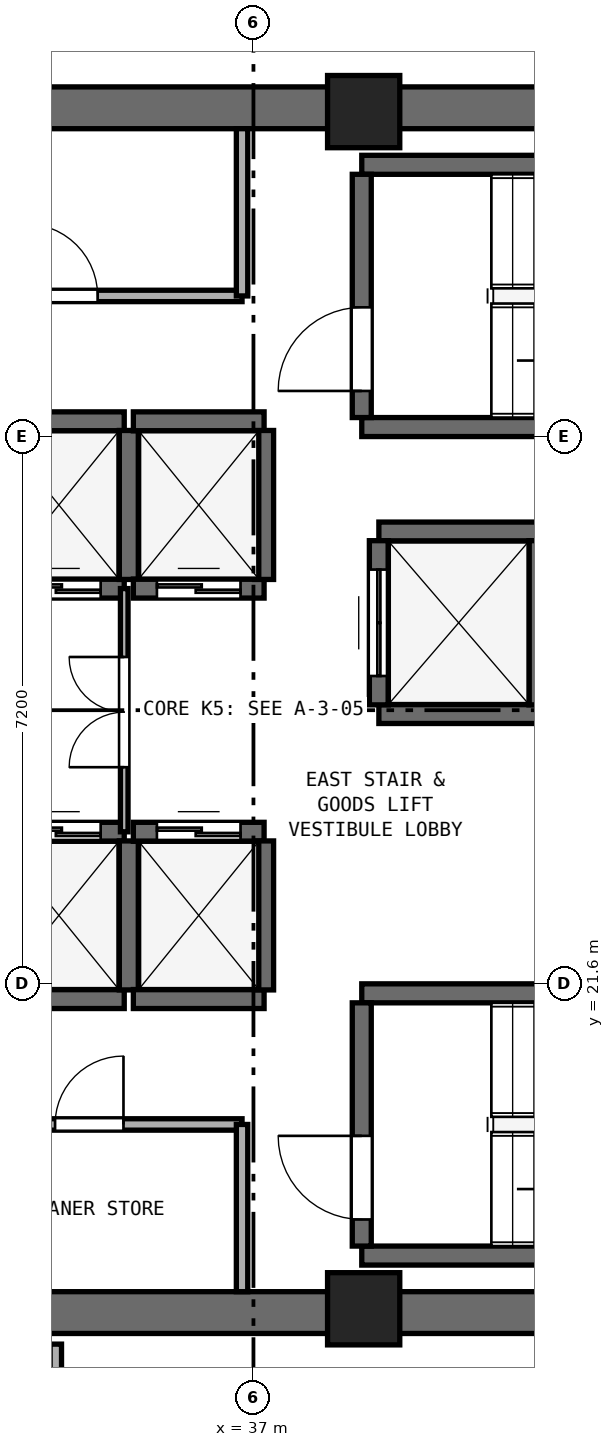
"""IFC4 building model, lengths in metres.
Left out: names, types, materials, properties, quantities, classifications, styles, units other than length and angle.
Written with IfcOpenShell. Run it as: python <this file> out.ifc"""

import sys

from ifc_helpers import new_model, si_unit, direction, frame, frame_2d, origin, origin_2d, place, context, subcontext, project, spatial, rectangle, extrude, element, fill, save


model = new_model("IFC4")
c1 = context("Model", 3, precision=1e-05, world=origin(), true_north=direction((0.0, 1.0)))
c2 = subcontext(c1, "Body", "Model", "MODEL_VIEW")
j1 = project(units=[si_unit("LENGTHUNIT", "METRE"), si_unit("PLANEANGLEUNIT", "RADIAN")], contexts=[c1])
p1 = place(None, origin())
s1 = spatial("IfcSite", under=j1, at=p1, CompositionType="ELEMENT")
p2 = place(p1, origin())
s2 = spatial("IfcBuilding", under=s1, at=p2, CompositionType="ELEMENT")
p3 = place(p2, frame((0.0, 0.0, 125.0)))
s3 = spatial("IfcBuildingStorey", under=s2, at=p3, CompositionType="ELEMENT", Elevation=125.0)
for number, where, z_axis, x_axis in (
    (1, (25.4, 17.275, 0.0), (0.0, 0.0, 1.0), (1.0, 0.0, 0.0)),
    (2, (25.4, 33.125, 0.0), (0.0, 0.0, 1.0), (1.0, 0.0, 0.0)),
):
    element("IfcWall", number, at=place(p3, frame(where, z_axis=z_axis, x_axis=x_axis)), inside=s3, PredefinedType="SHEAR", context=c2, shape_type="SweptSolid", body=[
        extrude(rectangle(XDim=23.2, YDim=0.55, at=frame_2d((11.6, 0.0))), origin(), (0.0, 0.0, 1.0), 3.54),
    ])
for number, where, z_axis, x_axis in (
    (3, (38.45, 17.325, 0.0), (0.0, 0.0, 1.0), (1.0, 0.0, 0.0)),
    (4, (38.45, 33.075, 0.0), (0.0, 0.0, 1.0), (1.0, 0.0, 0.0)),
):
    element("IfcColumn", number, at=place(p3, frame(where, z_axis=z_axis, x_axis=x_axis)), inside=s3, PredefinedType="PILASTER", context=c2, shape_type="SweptSolid", body=[
        extrude(rectangle(XDim=0.95, YDim=0.95, at=origin_2d()), origin(), (0.0, 0.0, 1.0), 3.8),
    ])
for number, where, z_axis, x_axis in (
    (5, (38.425, 28.925, 0.0), (0.0, 0.0, 1.0), (1.0, 0.0, 0.0)),
    (6, (38.425, 32.375, 0.0), (0.0, 0.0, 1.0), (1.0, 0.0, 0.0)),
):
    element("IfcWall", number, at=place(p3, frame(where, z_axis=z_axis, x_axis=x_axis)), inside=s3, PredefinedType="SHEAR", context=c2, shape_type="SweptSolid", body=[
        extrude(rectangle(XDim=7.3, YDim=0.25, at=frame_2d((3.65, 0.0))), origin(), (0.0, 0.0, 1.0), 3.54),
    ])
p4 = place(p3, frame((38.425, 29.05, 0.0), z_axis=(0.0, 0.0, 1.0), x_axis=(0.0, 1.0, 0.0)))
e7 = element("IfcWall", 7, at=p4, inside=s3, PredefinedType="SHEAR", context=c2, shape_type="SweptSolid", body=[
    extrude(rectangle(XDim=3.2, YDim=0.25, at=frame_2d((1.6, 0.0))), origin(), (0.0, 0.0, 1.0), 3.54),
])
p5 = place(p4, frame((0.35, 0.0, 0.0)))
e8 = element("IfcOpeningElement", 8, at=p5, cuts=e7, PredefinedType="OPENING", context=c2, shape_type="SweptSolid", body=[
    extrude(rectangle(XDim=1.1, YDim=2.15, at=frame_2d((0.55, 1.075))), frame((0.0, 0.135, 0.0), z_axis=(0.0, -1.0, 0.0), x_axis=(1.0, 0.0, 0.0)), (0.0, 0.0, 1.0), 0.27),
])
for number, where, z_axis, x_axis in (
    (9, (38.425, 18.025, 0.0), (0.0, 0.0, 1.0), (1.0, 0.0, 0.0)),
    (10, (38.425, 21.475, 0.0), (0.0, 0.0, 1.0), (1.0, 0.0, 0.0)),
):
    element("IfcWall", number, at=place(p3, frame(where, z_axis=z_axis, x_axis=x_axis)), inside=s3, PredefinedType="SHEAR", context=c2, shape_type="SweptSolid", body=[
        extrude(rectangle(XDim=7.3, YDim=0.25, at=frame_2d((3.65, 0.0))), origin(), (0.0, 0.0, 1.0), 3.54),
    ])
p6 = place(p3, frame((38.425, 18.15, 0.0), z_axis=(0.0, 0.0, 1.0), x_axis=(0.0, 1.0, 0.0)))
e11 = element("IfcWall", 11, at=p6, inside=s3, PredefinedType="SHEAR", context=c2, shape_type="SweptSolid", body=[
    extrude(rectangle(XDim=3.2, YDim=0.25, at=frame_2d((1.6, 0.0))), origin(), (0.0, 0.0, 1.0), 3.54),
])
p7 = place(p6, frame((0.35, 0.0, 0.0)))
e12 = element("IfcOpeningElement", 12, at=p7, cuts=e11, PredefinedType="OPENING", context=c2, shape_type="SweptSolid", body=[
    extrude(rectangle(XDim=1.1, YDim=2.15, at=frame_2d((0.55, 1.075))), frame((0.0, 0.135, 0.0), z_axis=(0.0, -1.0, 0.0), x_axis=(1.0, 0.0, 0.0)), (0.0, 0.0, 1.0), 0.27),
])
p8 = place(p3, frame((33.58, 21.4, 0.0), z_axis=(0.0, 0.0, 1.0), x_axis=(1.0, 0.0, 0.0)))
e13 = element("IfcWall", 13, at=p8, inside=s3, PredefinedType="SHEAR", context=c2, shape_type="SweptSolid", body=[
    extrude(rectangle(XDim=1.72, YDim=0.25, at=frame_2d((0.86, 0.0))), origin(), (0.0, 0.0, 1.0), 3.54),
])
p9 = place(p3, frame((33.58, 23.6, 0.0), z_axis=(0.0, 0.0, 1.0), x_axis=(1.0, 0.0, 0.0)))
e14 = element("IfcWall", 14, at=p9, inside=s3, PredefinedType="SHEAR", context=c2, shape_type="SweptSolid", body=[
    extrude(rectangle(XDim=1.72, YDim=0.25, at=frame_2d((0.86, 0.0))), origin(), (0.0, 0.0, 1.0), 3.54),
])
p10 = place(p9, frame((0.31, 0.0, 0.0)))
e15 = element("IfcOpeningElement", 15, at=p10, cuts=e14, PredefinedType="OPENING", context=c2, shape_type="SweptSolid", body=[
    extrude(rectangle(XDim=1.1, YDim=2.15, at=frame_2d((0.55, 1.075))), frame((0.0, 0.135, 0.0), z_axis=(0.0, -1.0, 0.0), x_axis=(1.0, 0.0, 0.0)), (0.0, 0.0, 1.0), 0.27),
])
p11 = place(p3, frame((35.36, 21.52, 0.0), z_axis=(0.0, 0.0, 1.0), x_axis=(0.0, 1.0, 0.0)))
e16 = element("IfcWall", 16, at=p11, inside=s3, PredefinedType="SHEAR", context=c2, shape_type="SweptSolid", body=[
    extrude(rectangle(XDim=1.96, YDim=0.25, at=frame_2d((0.98, 0.0))), origin(), (0.0, 0.0, 1.0), 3.54),
])
p12 = place(p3, frame((35.42, 21.4, 0.0), z_axis=(0.0, 0.0, 1.0), x_axis=(1.0, 0.0, 0.0)))
e17 = element("IfcWall", 17, at=p12, inside=s3, PredefinedType="SHEAR", context=c2, shape_type="SweptSolid", body=[
    extrude(rectangle(XDim=1.72, YDim=0.25, at=frame_2d((0.86, 0.0))), origin(), (0.0, 0.0, 1.0), 3.54),
])
p13 = place(p3, frame((35.42, 23.6, 0.0), z_axis=(0.0, 0.0, 1.0), x_axis=(1.0, 0.0, 0.0)))
e18 = element("IfcWall", 18, at=p13, inside=s3, PredefinedType="SHEAR", context=c2, shape_type="SweptSolid", body=[
    extrude(rectangle(XDim=1.72, YDim=0.25, at=frame_2d((0.86, 0.0))), origin(), (0.0, 0.0, 1.0), 3.54),
])
p14 = place(p13, frame((0.31, 0.0, 0.0)))
e19 = element("IfcOpeningElement", 19, at=p14, cuts=e18, PredefinedType="OPENING", context=c2, shape_type="SweptSolid", body=[
    extrude(rectangle(XDim=1.1, YDim=2.15, at=frame_2d((0.55, 1.075))), frame((0.0, 0.135, 0.0), z_axis=(0.0, -1.0, 0.0), x_axis=(1.0, 0.0, 0.0)), (0.0, 0.0, 1.0), 0.27),
])
p15 = place(p3, frame((37.14, 21.52, 0.0), z_axis=(0.0, 0.0, 1.0), x_axis=(0.0, 1.0, 0.0)))
e20 = element("IfcWall", 20, at=p15, inside=s3, PredefinedType="SHEAR", context=c2, shape_type="SweptSolid", body=[
    extrude(rectangle(XDim=1.96, YDim=0.25, at=frame_2d((0.98, 0.0))), origin(), (0.0, 0.0, 1.0), 3.54),
])
p16 = place(p3, frame((33.58, 26.8, 0.0), z_axis=(0.0, 0.0, 1.0), x_axis=(1.0, 0.0, 0.0)))
e21 = element("IfcWall", 21, at=p16, inside=s3, PredefinedType="SHEAR", context=c2, shape_type="SweptSolid", body=[
    extrude(rectangle(XDim=1.72, YDim=0.25, at=frame_2d((0.86, 0.0))), origin(), (0.0, 0.0, 1.0), 3.54),
])
p17 = place(p16, frame((0.31, 0.0, 0.0)))
e22 = element("IfcOpeningElement", 22, at=p17, cuts=e21, PredefinedType="OPENING", context=c2, shape_type="SweptSolid", body=[
    extrude(rectangle(XDim=1.1, YDim=2.15, at=frame_2d((0.55, 1.075))), frame((0.0, 0.135, 0.0), z_axis=(0.0, -1.0, 0.0), x_axis=(1.0, 0.0, 0.0)), (0.0, 0.0, 1.0), 0.27),
])
p18 = place(p3, frame((33.58, 29.0, 0.0), z_axis=(0.0, 0.0, 1.0), x_axis=(1.0, 0.0, 0.0)))
e23 = element("IfcWall", 23, at=p18, inside=s3, PredefinedType="SHEAR", context=c2, shape_type="SweptSolid", body=[
    extrude(rectangle(XDim=1.72, YDim=0.25, at=frame_2d((0.86, 0.0))), origin(), (0.0, 0.0, 1.0), 3.54),
])
p19 = place(p3, frame((35.36, 26.92, 0.0), z_axis=(0.0, 0.0, 1.0), x_axis=(0.0, 1.0, 0.0)))
e24 = element("IfcWall", 24, at=p19, inside=s3, PredefinedType="SHEAR", context=c2, shape_type="SweptSolid", body=[
    extrude(rectangle(XDim=1.96, YDim=0.25, at=frame_2d((0.98, 0.0))), origin(), (0.0, 0.0, 1.0), 3.54),
])
p20 = place(p3, frame((35.42, 26.8, 0.0), z_axis=(0.0, 0.0, 1.0), x_axis=(1.0, 0.0, 0.0)))
e25 = element("IfcWall", 25, at=p20, inside=s3, PredefinedType="SHEAR", context=c2, shape_type="SweptSolid", body=[
    extrude(rectangle(XDim=1.72, YDim=0.25, at=frame_2d((0.86, 0.0))), origin(), (0.0, 0.0, 1.0), 3.54),
])
p21 = place(p20, frame((0.31, 0.0, 0.0)))
e26 = element("IfcOpeningElement", 26, at=p21, cuts=e25, PredefinedType="OPENING", context=c2, shape_type="SweptSolid", body=[
    extrude(rectangle(XDim=1.1, YDim=2.15, at=frame_2d((0.55, 1.075))), frame((0.0, 0.135, 0.0), z_axis=(0.0, -1.0, 0.0), x_axis=(1.0, 0.0, 0.0)), (0.0, 0.0, 1.0), 0.27),
])
p22 = place(p3, frame((35.42, 29.0, 0.0), z_axis=(0.0, 0.0, 1.0), x_axis=(1.0, 0.0, 0.0)))
e27 = element("IfcWall", 27, at=p22, inside=s3, PredefinedType="SHEAR", context=c2, shape_type="SweptSolid", body=[
    extrude(rectangle(XDim=1.72, YDim=0.25, at=frame_2d((0.86, 0.0))), origin(), (0.0, 0.0, 1.0), 3.54),
])
p23 = place(p3, frame((37.14, 26.92, 0.0), z_axis=(0.0, 0.0, 1.0), x_axis=(0.0, 1.0, 0.0)))
e28 = element("IfcWall", 28, at=p23, inside=s3, PredefinedType="SHEAR", context=c2, shape_type="SweptSolid", body=[
    extrude(rectangle(XDim=1.96, YDim=0.25, at=frame_2d((0.98, 0.0))), origin(), (0.0, 0.0, 1.0), 3.54),
])
for number, where, z_axis, x_axis in (
    (29, (38.65, 25.15, 0.0), (0.0, 0.0, 1.0), (1.0, 0.0, 0.0)),
    (30, (38.65, 27.55, 0.0), (0.0, 0.0, 1.0), (1.0, 0.0, 0.0)),
):
    element("IfcWall", number, at=place(p3, frame(where, z_axis=z_axis, x_axis=x_axis)), inside=s3, PredefinedType="SHEAR", context=c2, shape_type="SweptSolid", body=[
        extrude(rectangle(XDim=2.1, YDim=0.25, at=frame_2d((1.05, 0.0))), origin(), (0.0, 0.0, 1.0), 3.54),
    ])
p24 = place(p3, frame((38.65, 25.27, 0.0), z_axis=(0.0, 0.0, 1.0), x_axis=(0.0, 1.0, 0.0)))
e31 = element("IfcWall", 31, at=p24, inside=s3, PredefinedType="SHEAR", context=c2, shape_type="SweptSolid", body=[
    extrude(rectangle(XDim=2.16, YDim=0.25, at=frame_2d((1.08, 0.0))), origin(), (0.0, 0.0, 1.0), 3.54),
])
p25 = place(p24, frame((0.38, 0.0, 0.0)))
e32 = element("IfcOpeningElement", 32, at=p25, cuts=e31, PredefinedType="OPENING", context=c2, shape_type="SweptSolid", body=[
    extrude(rectangle(XDim=1.4, YDim=2.2, at=frame_2d((0.7, 1.1))), frame((0.0, 0.135, 0.0), z_axis=(0.0, -1.0, 0.0), x_axis=(1.0, 0.0, 0.0)), (0.0, 0.0, 1.0), 0.27),
])
p26 = place(p3, frame((40.75, 25.27, 0.0), z_axis=(0.0, 0.0, 1.0), x_axis=(0.0, 1.0, 0.0)))
e33 = element("IfcWall", 33, at=p26, inside=s3, PredefinedType="SHEAR", context=c2, shape_type="SweptSolid", body=[
    extrude(rectangle(XDim=2.16, YDim=0.25, at=frame_2d((1.08, 0.0))), origin(), (0.0, 0.0, 1.0), 3.54),
])
p27 = place(p3, frame((32.1, 30.65, 0.0), z_axis=(0.0, 0.0, 1.0), x_axis=(1.0, 0.0, 0.0)))
e34 = element("IfcWall", 34, at=p27, inside=s3, PredefinedType="PARTITIONING", context=c2, shape_type="SweptSolid", body=[
    extrude(rectangle(XDim=4.75, YDim=0.15, at=frame_2d((2.375, 0.0))), origin(), (0.0, 0.0, 1.0), 3.54),
])
p28 = place(p27, frame((1.9, 0.0, 0.0)))
e35 = element("IfcOpeningElement", 35, at=p28, cuts=e34, PredefinedType="OPENING", context=c2, shape_type="SweptSolid", body=[
    extrude(rectangle(XDim=0.95, YDim=2.1, at=frame_2d((0.475, 1.05))), frame((0.0, 0.085, 0.0), z_axis=(0.0, -1.0, 0.0), x_axis=(1.0, 0.0, 0.0)), (0.0, 0.0, 1.0), 0.17),
])
p29 = place(p3, frame((36.85, 30.65, 0.0), z_axis=(0.0, 0.0, 1.0), x_axis=(0.0, 1.0, 0.0)))
e36 = element("IfcWall", 36, at=p29, inside=s3, PredefinedType="PARTITIONING", context=c2, shape_type="SweptSolid", body=[
    extrude(rectangle(XDim=2.2, YDim=0.15, at=frame_2d((1.1, 0.0))), origin(), (0.0, 0.0, 1.0), 3.54),
])
p30 = place(p3, frame((32.83, 19.75, 0.0), z_axis=(0.0, 0.0, 1.0), x_axis=(1.0, 0.0, 0.0)))
e37 = element("IfcWall", 37, at=p30, inside=s3, PredefinedType="PARTITIONING", context=c2, shape_type="SweptSolid", body=[
    extrude(rectangle(XDim=4.02, YDim=0.15, at=frame_2d((2.01, 0.0))), origin(), (0.0, 0.0, 1.0), 3.54),
])
p31 = place(p30, frame((1.56, 0.0, 0.0)))
e38 = element("IfcOpeningElement", 38, at=p31, cuts=e37, PredefinedType="OPENING", context=c2, shape_type="SweptSolid", body=[
    extrude(rectangle(XDim=0.9, YDim=2.1, at=frame_2d((0.45, 1.05))), frame((0.0, 0.085, 0.0), z_axis=(0.0, -1.0, 0.0), x_axis=(1.0, 0.0, 0.0)), (0.0, 0.0, 1.0), 0.17),
])
p32 = place(p3, frame((36.85, 17.55, 0.0), z_axis=(0.0, 0.0, 1.0), x_axis=(0.0, 1.0, 0.0)))
e39 = element("IfcWall", 39, at=p32, inside=s3, PredefinedType="PARTITIONING", context=c2, shape_type="SweptSolid", body=[
    extrude(rectangle(XDim=2.2, YDim=0.15, at=frame_2d((1.1, 0.0))), origin(), (0.0, 0.0, 1.0), 3.54),
])
p33 = place(p3, frame((35.3, 23.6, 0.0), z_axis=(0.0, 0.0, 1.0), x_axis=(0.0, 1.0, 0.0)))
e40 = element("IfcWall", 40, at=p33, inside=s3, PredefinedType="PARTITIONING", context=c2, shape_type="SweptSolid", body=[
    extrude(rectangle(XDim=3.2, YDim=0.1, at=frame_2d((1.6, 0.0))), origin(), (0.0, 0.0, 1.0), 3.54),
])
p34 = place(p33, frame((0.85, 0.0, 0.0)))
e41 = element("IfcOpeningElement", 41, at=p34, cuts=e40, PredefinedType="OPENING", context=c2, shape_type="SweptSolid", body=[
    extrude(rectangle(XDim=1.45, YDim=2.12, at=frame_2d((0.725, 1.06))), frame((0.0, 0.06, 0.0), z_axis=(0.0, -1.0, 0.0), x_axis=(1.0, 0.0, 0.0)), (0.0, 0.0, 1.0), 0.12),
])
p35 = place(p3, frame((34.4, 15.2, 0.0), z_axis=(0.0, 0.0, 1.0), x_axis=(0.0, 1.0, 0.0)))
e42 = element("IfcWall", 42, at=p35, inside=s3, PredefinedType="PARTITIONING", context=c2, shape_type="SweptSolid", body=[
    extrude(rectangle(XDim=1.66, YDim=0.15, at=frame_2d((0.83, 0.0))), origin(), (0.0, 0.0, 1.0), 3.54),
])
p36 = place(p5, origin())
e43 = element("IfcDoor", 43, at=p36, inside=s3, OperationType="SINGLE_SWING_LEFT", PredefinedType="DOOR", context=c2, shape_type="SweptSolid", body=[
    extrude(rectangle(XDim=1.1, YDim=2.15, at=frame_2d((0.55, 1.075))), frame((0.0, 0.025, 0.0), z_axis=(0.0, -1.0, 0.0), x_axis=(1.0, 0.0, 0.0)), (0.0, 0.0, 1.0), 0.05),
])
fill(e8, e43)
p37 = place(p7, origin())
e44 = element("IfcDoor", 44, at=p37, inside=s3, OperationType="SINGLE_SWING_RIGHT", PredefinedType="DOOR", context=c2, shape_type="SweptSolid", body=[
    extrude(rectangle(XDim=1.1, YDim=2.15, at=frame_2d((0.55, 1.075))), frame((0.0, 0.025, 0.0), z_axis=(0.0, -1.0, 0.0), x_axis=(1.0, 0.0, 0.0)), (0.0, 0.0, 1.0), 0.05),
])
fill(e12, e44)
p38 = place(p10, origin())
e45 = element("IfcDoor", 45, at=p38, inside=s3, OperationType="DOUBLE_DOOR_SLIDING", PredefinedType="DOOR", context=c2, shape_type="SweptSolid", body=[
    extrude(rectangle(XDim=1.1, YDim=2.15, at=frame_2d((0.55, 1.075))), frame((0.0, 0.025, 0.0), z_axis=(0.0, -1.0, 0.0), x_axis=(1.0, 0.0, 0.0)), (0.0, 0.0, 1.0), 0.05),
])
fill(e15, e45)
p39 = place(p14, origin())
e46 = element("IfcDoor", 46, at=p39, inside=s3, OperationType="DOUBLE_DOOR_SLIDING", PredefinedType="DOOR", context=c2, shape_type="SweptSolid", body=[
    extrude(rectangle(XDim=1.1, YDim=2.15, at=frame_2d((0.55, 1.075))), frame((0.0, 0.025, 0.0), z_axis=(0.0, -1.0, 0.0), x_axis=(1.0, 0.0, 0.0)), (0.0, 0.0, 1.0), 0.05),
])
fill(e19, e46)
p40 = place(p17, origin())
e47 = element("IfcDoor", 47, at=p40, inside=s3, OperationType="DOUBLE_DOOR_SLIDING", PredefinedType="DOOR", context=c2, shape_type="SweptSolid", body=[
    extrude(rectangle(XDim=1.1, YDim=2.15, at=frame_2d((0.55, 1.075))), frame((0.0, 0.025, 0.0), z_axis=(0.0, -1.0, 0.0), x_axis=(1.0, 0.0, 0.0)), (0.0, 0.0, 1.0), 0.05),
])
fill(e22, e47)
p41 = place(p21, origin())
e48 = element("IfcDoor", 48, at=p41, inside=s3, OperationType="DOUBLE_DOOR_SLIDING", PredefinedType="DOOR", context=c2, shape_type="SweptSolid", body=[
    extrude(rectangle(XDim=1.1, YDim=2.15, at=frame_2d((0.55, 1.075))), frame((0.0, 0.025, 0.0), z_axis=(0.0, -1.0, 0.0), x_axis=(1.0, 0.0, 0.0)), (0.0, 0.0, 1.0), 0.05),
])
fill(e26, e48)
p42 = place(p25, origin())
e49 = element("IfcDoor", 49, at=p42, inside=s3, OperationType="DOUBLE_DOOR_SLIDING", PredefinedType="DOOR", context=c2, shape_type="SweptSolid", body=[
    extrude(rectangle(XDim=1.4, YDim=2.2, at=frame_2d((0.7, 1.1))), frame((0.0, 0.025, 0.0), z_axis=(0.0, -1.0, 0.0), x_axis=(1.0, 0.0, 0.0)), (0.0, 0.0, 1.0), 0.05),
])
fill(e32, e49)
p43 = place(p28, origin())
e50 = element("IfcDoor", 50, at=p43, inside=s3, OperationType="SINGLE_SWING_LEFT", PredefinedType="DOOR", context=c2, shape_type="SweptSolid", body=[
    extrude(rectangle(XDim=0.95, YDim=2.1, at=frame_2d((0.475, 1.05))), frame((0.0, 0.025, 0.0), z_axis=(0.0, -1.0, 0.0), x_axis=(1.0, 0.0, 0.0)), (0.0, 0.0, 1.0), 0.05),
])
fill(e35, e50)
p44 = place(p31, origin())
e51 = element("IfcDoor", 51, at=p44, inside=s3, OperationType="SINGLE_SWING_RIGHT", PredefinedType="DOOR", context=c2, shape_type="SweptSolid", body=[
    extrude(rectangle(XDim=0.9, YDim=2.1, at=frame_2d((0.45, 1.05))), frame((0.0, 0.025, 0.0), z_axis=(0.0, -1.0, 0.0), x_axis=(1.0, 0.0, 0.0)), (0.0, 0.0, 1.0), 0.05),
])
fill(e38, e51)
p45 = place(p34, origin())
e52 = element("IfcDoor", 52, at=p45, inside=s3, OperationType="DOUBLE_DOOR_SINGLE_SWING", PredefinedType="DOOR", context=c2, shape_type="SweptSolid", body=[
    extrude(rectangle(XDim=1.45, YDim=2.12, at=frame_2d((0.725, 1.06))), frame((0.0, 0.025, 0.0), z_axis=(0.0, -1.0, 0.0), x_axis=(1.0, 0.0, 0.0)), (0.0, 0.0, 1.0), 0.05),
])
fill(e41, e52)
save(model, sys.argv[1])
